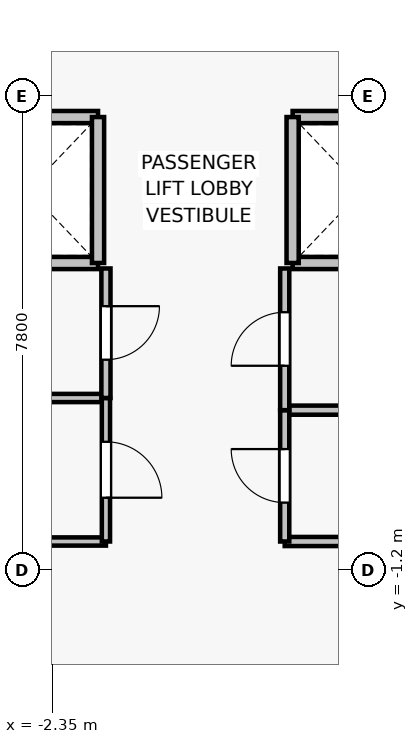
"""IFC4 building model, lengths in metres.
Left out: names, types, materials, properties, quantities, classifications, styles, units other than length and angle.
Written with IfcOpenShell. Run it as: python <this file> out.ifc"""

import sys

from ifc_helpers import new_model, si_unit, direction, frame, frame_2d, origin, place, context, subcontext, project, spatial, rectangle, extrude, source, transform, mapped, element, fill, save


model = new_model("IFC4")
c1 = context("Model", 3, precision=1e-05, world=origin(), true_north=direction((0.0, 1.0)))
c2 = subcontext(c1, "Body", "Model", "MODEL_VIEW")
j1 = project(units=[si_unit("LENGTHUNIT", "METRE"), si_unit("PLANEANGLEUNIT", "RADIAN")], contexts=[c1])
p1 = place(None, origin())
s1 = spatial("IfcSite", under=j1, at=p1, CompositionType="ELEMENT")
p2 = place(p1, origin())
s2 = spatial("IfcBuilding", under=s1, at=p2, CompositionType="ELEMENT")
p3 = place(p2, frame((0.0, 0.0, 63.7)))
s3 = spatial("IfcBuildingStorey", under=s2, at=p3, CompositionType="ELEMENT", Elevation=63.7)
for number, where, z_axis, x_axis in (
    (1, (-1.6, 3.85, 0.0), (0.0, 0.0, 1.0), (-1.0, 0.0, 0.0)),
    (2, (-3.9, 6.25, 0.0), (0.0, 0.0, 1.0), (1.0, 0.0, 0.0)),
):
    element("IfcWall", number, at=place(p3, frame(where, z_axis=z_axis, x_axis=x_axis)), inside=s3, PredefinedType="SOLIDWALL", context=c2, shape_type="SweptSolid", body=[
        extrude(rectangle(XDim=2.3, YDim=0.2, at=frame_2d((1.15, 0.0))), origin(), (0.0, 0.0, 1.0), 3.075),
    ])
p4 = place(p3, frame((-1.6, 6.25, 0.0), z_axis=(0.0, 0.0, 1.0), x_axis=(0.0, -1.0, 0.0)))
e3 = element("IfcWall", 3, at=p4, inside=s3, PredefinedType="SOLIDWALL", context=c2, shape_type="SweptSolid", body=[
    extrude(rectangle(XDim=2.4, YDim=0.2, at=frame_2d((1.2, 0.0))), origin(), (0.0, 0.0, 1.0), 3.075),
])
for number, where, z_axis, x_axis in (
    (4, (3.9, 3.85, 0.0), (0.0, 0.0, 1.0), (-1.0, 0.0, 0.0)),
    (5, (1.6, 6.25, 0.0), (0.0, 0.0, 1.0), (1.0, 0.0, 0.0)),
):
    element("IfcWall", number, at=place(p3, frame(where, z_axis=z_axis, x_axis=x_axis)), inside=s3, PredefinedType="SOLIDWALL", context=c2, shape_type="SweptSolid", body=[
        extrude(rectangle(XDim=2.3, YDim=0.2, at=frame_2d((1.15, 0.0))), origin(), (0.0, 0.0, 1.0), 3.075),
    ])
p5 = place(p3, frame((1.6, 3.85, 0.0), z_axis=(0.0, 0.0, 1.0), x_axis=(0.0, 1.0, 0.0)))
e6 = element("IfcWall", 6, at=p5, inside=s3, PredefinedType="SOLIDWALL", context=c2, shape_type="SweptSolid", body=[
    extrude(rectangle(XDim=2.4, YDim=0.2, at=frame_2d((1.2, 0.0))), origin(), (0.0, 0.0, 1.0), 3.075),
])
for number, where, z_axis, x_axis in (
    (7, (-1.47, -0.73, 0.0), (0.0, 0.0, 1.0), (-1.0, 0.0, 0.0)),
    (8, (-3.47, 1.63, 0.0), (0.0, 0.0, 1.0), (1.0, 0.0, 0.0)),
):
    element("IfcWall", number, at=place(p3, frame(where, z_axis=z_axis, x_axis=x_axis)), inside=s3, PredefinedType="PARTITIONING", context=c2, shape_type="SweptSolid", body=[
        extrude(rectangle(XDim=2.0, YDim=0.135, at=frame_2d((1.0, 0.0))), origin(), (0.0, 0.0, 1.0), 3.075),
    ])
p6 = place(p3, frame((-1.47, 1.63, 0.0), z_axis=(0.0, 0.0, 1.0), x_axis=(0.0, -1.0, 0.0)))
e9 = element("IfcWall", 9, at=p6, inside=s3, PredefinedType="PARTITIONING", context=c2, shape_type="SweptSolid", body=[
    extrude(rectangle(XDim=2.36, YDim=0.135, at=frame_2d((1.18, 0.0))), origin(), (0.0, 0.0, 1.0), 3.075),
])
p7 = place(p6, frame((0.72, 0.0, 0.0)))
e10 = element("IfcOpeningElement", 10, at=p7, cuts=e9, PredefinedType="OPENING", context=c2, shape_type="SweptSolid", body=[
    extrude(rectangle(XDim=0.92, YDim=2.1, at=frame_2d((0.46, 1.05))), frame((0.0, 0.077, 0.0), z_axis=(0.0, -1.0, 0.0), x_axis=(1.0, 0.0, 0.0)), (0.0, 0.0, 1.0), 0.155),
])
p8 = place(p3, frame((-1.47, 3.76, 0.0), z_axis=(0.0, 0.0, 1.0), x_axis=(0.0, -1.0, 0.0)))
e11 = element("IfcWall", 11, at=p8, inside=s3, PredefinedType="PARTITIONING", context=c2, shape_type="SweptSolid", body=[
    extrude(rectangle(XDim=2.13, YDim=0.15, at=frame_2d((1.065, 0.0))), origin(), (0.0, 0.0, 1.0), 3.075),
])
p9 = place(p8, frame((0.62, 0.0, 0.0)))
e12 = element("IfcOpeningElement", 12, at=p9, cuts=e11, PredefinedType="OPENING", context=c2, shape_type="SweptSolid", body=[
    extrude(rectangle(XDim=0.88, YDim=2.1, at=frame_2d((0.44, 1.05))), frame((0.0, 0.085, 0.0), z_axis=(0.0, -1.0, 0.0), x_axis=(1.0, 0.0, 0.0)), (0.0, 0.0, 1.0), 0.17),
])
for number, where, z_axis, x_axis in (
    (13, (3.68, -0.73, 0.0), (0.0, 0.0, 1.0), (-1.0, 0.0, 0.0)),
    (14, (1.47, 1.43, 0.0), (0.0, 0.0, 1.0), (1.0, 0.0, 0.0)),
):
    element("IfcWall", number, at=place(p3, frame(where, z_axis=z_axis, x_axis=x_axis)), inside=s3, PredefinedType="PARTITIONING", context=c2, shape_type="SweptSolid", body=[
        extrude(rectangle(XDim=2.21, YDim=0.15, at=frame_2d((1.105, 0.0))), origin(), (0.0, 0.0, 1.0), 3.075),
    ])
p10 = place(p3, frame((1.47, -0.73, 0.0), z_axis=(0.0, 0.0, 1.0), x_axis=(0.0, 1.0, 0.0)))
e15 = element("IfcWall", 15, at=p10, inside=s3, PredefinedType="PARTITIONING", context=c2, shape_type="SweptSolid", body=[
    extrude(rectangle(XDim=2.16, YDim=0.15, at=frame_2d((1.08, 0.0))), origin(), (0.0, 0.0, 1.0), 3.075),
])
p11 = place(p10, frame((0.64, 0.0, 0.0)))
e16 = element("IfcOpeningElement", 16, at=p11, cuts=e15, PredefinedType="OPENING", context=c2, shape_type="SweptSolid", body=[
    extrude(rectangle(XDim=0.88, YDim=2.1, at=frame_2d((0.44, 1.05))), frame((0.0, 0.085, 0.0), z_axis=(0.0, -1.0, 0.0), x_axis=(1.0, 0.0, 0.0)), (0.0, 0.0, 1.0), 0.17),
])
p12 = place(p3, frame((1.47, 1.43, 0.0), z_axis=(0.0, 0.0, 1.0), x_axis=(0.0, 1.0, 0.0)))
e17 = element("IfcWall", 17, at=p12, inside=s3, PredefinedType="PARTITIONING", context=c2, shape_type="SweptSolid", body=[
    extrude(rectangle(XDim=2.33, YDim=0.15, at=frame_2d((1.165, 0.0))), origin(), (0.0, 0.0, 1.0), 3.075),
])
p13 = place(p12, frame((0.73, 0.0, 0.0)))
e18 = element("IfcOpeningElement", 18, at=p13, cuts=e17, PredefinedType="OPENING", context=c2, shape_type="SweptSolid", body=[
    extrude(rectangle(XDim=0.88, YDim=2.15, at=frame_2d((0.44, 1.075))), frame((0.0, 0.085, 0.0), z_axis=(0.0, -1.0, 0.0), x_axis=(1.0, 0.0, 0.0)), (0.0, 0.0, 1.0), 0.17),
])
m1 = source(origin(), c2, "Body", "SweptSolid", [
    extrude(rectangle(XDim=0.92, YDim=2.1, at=frame_2d((0.46, 1.05))), frame((0.0, 0.025, 0.0), z_axis=(0.0, -1.0, 0.0), x_axis=(1.0, 0.0, 0.0)), (0.0, 0.0, 1.0), 0.05),
])
p14 = place(p7, origin())
e19 = element("IfcDoor", 19, at=p14, inside=s3, OperationType="SINGLE_SWING_RIGHT", PredefinedType="DOOR", context=c2, shape_type="MappedRepresentation", body=[
    mapped(m1, transform((0.0, 0.0, 0.0), x_axis=(1.0, 0.0, 0.0), y_axis=(0.0, 1.0, 0.0), z_axis=(0.0, 0.0, 1.0), scale=1.0)),
])
fill(e10, e19)
m2 = source(origin(), c2, "Body", "SweptSolid", [
    extrude(rectangle(XDim=0.88, YDim=2.1, at=frame_2d((0.44, 1.05))), frame((0.0, 0.025, 0.0), z_axis=(0.0, -1.0, 0.0), x_axis=(1.0, 0.0, 0.0)), (0.0, 0.0, 1.0), 0.05),
])
p15 = place(p9, origin())
e20 = element("IfcDoor", 20, at=p15, inside=s3, OperationType="SINGLE_SWING_LEFT", PredefinedType="DOOR", context=c2, shape_type="MappedRepresentation", body=[
    mapped(m2, transform((0.0, 0.0, 0.0), x_axis=(1.0, 0.0, 0.0), y_axis=(0.0, 1.0, 0.0), z_axis=(0.0, 0.0, 1.0), scale=1.0)),
])
fill(e12, e20)
p16 = place(p11, origin())
e21 = element("IfcDoor", 21, at=p16, inside=s3, OperationType="SINGLE_SWING_RIGHT", PredefinedType="DOOR", context=c2, shape_type="MappedRepresentation", body=[
    mapped(m2, transform((0.0, 0.0, 0.0), x_axis=(1.0, 0.0, 0.0), y_axis=(0.0, 1.0, 0.0), z_axis=(0.0, 0.0, 1.0), scale=1.0)),
])
fill(e16, e21)
m3 = source(origin(), c2, "Body", "SweptSolid", [
    extrude(rectangle(XDim=0.88, YDim=2.15, at=frame_2d((0.44, 1.075))), frame((0.0, 0.025, 0.0), z_axis=(0.0, -1.0, 0.0), x_axis=(1.0, 0.0, 0.0)), (0.0, 0.0, 1.0), 0.05),
])
p17 = place(p13, origin())
e22 = element("IfcDoor", 22, at=p17, inside=s3, OperationType="SINGLE_SWING_LEFT", PredefinedType="DOOR", context=c2, shape_type="MappedRepresentation", body=[
    mapped(m3, transform((0.0, 0.0, 0.0), x_axis=(1.0, 0.0, 0.0), y_axis=(0.0, 1.0, 0.0), z_axis=(0.0, 0.0, 1.0), scale=1.0)),
])
fill(e18, e22)
save(model, sys.argv[1])
